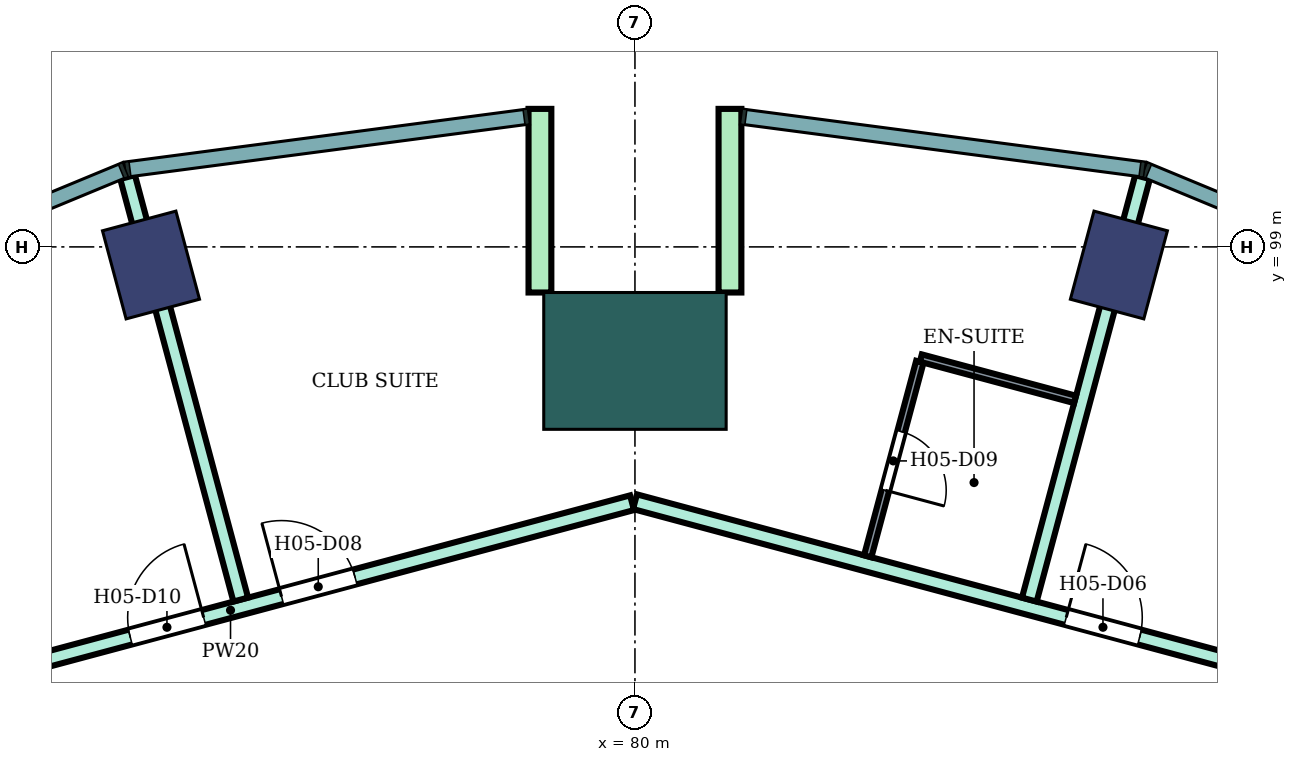
"""IFC4 building model, lengths in metres.
Left out: names, types, materials, properties, quantities, classifications, styles, units other than length and angle.
Written with IfcOpenShell. Run it as: python <this file> out.ifc"""

import sys

from ifc_helpers import new_model, si_unit, direction, frame, frame_2d, origin, origin_2d, place, context, subcontext, project, spatial, rectangle, extrude, element, fill, save


model = new_model("IFC4")
c1 = context("Model", 3, precision=1e-05, world=origin(), true_north=direction((0.0, 1.0)))
c2 = subcontext(c1, "Body", "Model", "MODEL_VIEW")
j1 = project(units=[si_unit("LENGTHUNIT", "METRE"), si_unit("PLANEANGLEUNIT", "RADIAN")], contexts=[c1])
p1 = place(None, origin())
s1 = spatial("IfcSite", under=j1, at=p1, CompositionType="ELEMENT")
p2 = place(p1, origin())
s2 = spatial("IfcBuilding", under=s1, at=p2, CompositionType="ELEMENT")
p3 = place(p2, frame((0.0, 0.0, 82.4)))
s3 = spatial("IfcBuildingStorey", under=s2, at=p3, CompositionType="ELEMENT", Elevation=82.4)
for number, where, z_axis, x_axis in (
    (1, (86.367, 98.762, 0.0), (0.0, 0.0, 1.0), (0.259, 0.966, 0.0)),
    (2, (73.633, 98.762, 0.0), (0.0, 0.0, 1.0), (-0.259, 0.966, 0.0)),
):
    element("IfcColumn", number, at=place(p3, frame(where, z_axis=z_axis, x_axis=x_axis)), inside=s3, PredefinedType="COLUMN", context=c2, shape_type="SweptSolid", body=[
        extrude(rectangle(XDim=1.2, YDim=1.0, at=origin_2d()), origin(), (0.0, 0.0, 1.0), 3.8),
    ])
p4 = place(p3, frame((80.0, 97.5, 0.0), z_axis=(0.0, 0.0, 1.0), x_axis=(0.0, 1.0, 0.0)))
e3 = element("IfcColumn", 3, at=p4, inside=s3, PredefinedType="COLUMN", context=c2, shape_type="SweptSolid", body=[
    extrude(rectangle(XDim=1.8, YDim=2.4, at=origin_2d()), origin(), (0.0, 0.0, 1.0), 3.8),
])
for number, where, z_axis, x_axis in (
    (4, (81.25, 98.4, 0.0), (0.0, 0.0, 1.0), (0.0, 1.0, 0.0)),
    (5, (78.75, 98.4, 0.0), (0.0, 0.0, 1.0), (0.0, 1.0, 0.0)),
):
    element("IfcWall", number, at=place(p3, frame(where, z_axis=z_axis, x_axis=x_axis)), inside=s3, PredefinedType="NOTDEFINED", context=c2, shape_type="SweptSolid", body=[
        extrude(rectangle(XDim=2.416, YDim=0.3, at=frame_2d((1.208, 0.0))), origin(), (0.0, 0.0, 1.0), 3.8),
    ])
p5 = place(p3, frame((69.397, 92.805, 0.0), z_axis=(0.0, 0.0, 1.0), x_axis=(0.96596468683, 0.258673972015, 0.0)))
e6 = element("IfcWall", 6, at=p5, inside=s3, PredefinedType="PARTITIONING", context=c2, shape_type="SweptSolid", body=[
    extrude(rectangle(XDim=10.937, YDim=0.2, at=frame_2d((5.469, 0.0))), origin(), (0.0, 0.0, 1.0), 3.35),
])
p6 = place(p5, frame((6.163, 0.0, 0.0)))
e7 = element("IfcOpeningElement", 7, at=p6, cuts=e6, PredefinedType="OPENING", context=c2, shape_type="SweptSolid", body=[
    extrude(rectangle(XDim=1.0, YDim=2.1, at=frame_2d((0.5, 1.05))), frame((0.0, 0.11, 0.0), z_axis=(0.0, -1.0, 0.0), x_axis=(1.0, 0.0, 0.0)), (0.0, 0.0, 1.0), 0.22),
])
p7 = place(p5, frame((4.103, 0.0, 0.0)))
e8 = element("IfcOpeningElement", 8, at=p7, cuts=e6, PredefinedType="OPENING", context=c2, shape_type="SweptSolid", body=[
    extrude(rectangle(XDim=1.0, YDim=2.1, at=frame_2d((0.5, 1.05))), frame((0.0, 0.11, 0.0), z_axis=(0.0, -1.0, 0.0), x_axis=(1.0, 0.0, 0.0)), (0.0, 0.0, 1.0), 0.22),
])
p8 = place(p3, frame((73.325, 99.919, 0.0), z_axis=(0.0, 0.0, 1.0), x_axis=(0.25871346471, -0.965954110286, 0.0)))
e9 = element("IfcWall", 9, at=p8, inside=s3, PredefinedType="PARTITIONING", context=c2, shape_type="SweptSolid", body=[
    extrude(rectangle(XDim=5.754, YDim=0.2, at=frame_2d((2.877, 0.0))), origin(), (0.0, 0.0, 1.0), 3.35),
])
p9 = place(p3, frame((80.0, 95.648, 0.0), z_axis=(0.0, 0.0, 1.0), x_axis=(0.965852259202, -0.259093445292, 0.0)))
e10 = element("IfcWall", 10, at=p9, inside=s3, PredefinedType="PARTITIONING", context=c2, shape_type="SweptSolid", body=[
    extrude(rectangle(XDim=10.597, YDim=0.2, at=frame_2d((5.298, 0.0))), origin(), (0.0, 0.0, 1.0), 3.35),
])
p10 = place(p9, frame((5.875, 0.0, 0.0)))
e11 = element("IfcOpeningElement", 11, at=p10, cuts=e10, PredefinedType="OPENING", context=c2, shape_type="SweptSolid", body=[
    extrude(rectangle(XDim=1.0, YDim=2.1, at=frame_2d((0.5, 1.05))), frame((0.0, 0.11, 0.0), z_axis=(0.0, -1.0, 0.0), x_axis=(1.0, 0.0, 0.0)), (0.0, 0.0, 1.0), 0.22),
])
p11 = place(p3, frame((85.188, 94.36, 0.0), z_axis=(0.0, 0.0, 1.0), x_axis=(0.258882407816, 0.965908846074, 0.0)))
e12 = element("IfcWall", 12, at=p11, inside=s3, PredefinedType="PARTITIONING", context=c2, shape_type="SweptSolid", body=[
    extrude(rectangle(XDim=5.755, YDim=0.2, at=frame_2d((2.877, 0.0))), origin(), (0.0, 0.0, 1.0), 3.35),
])
p12 = place(p3, frame((83.062, 94.929, 0.0), z_axis=(0.0, 0.0, 1.0), x_axis=(0.258889588814, 0.965906921398, 0.0)))
e13 = element("IfcWall", 13, at=p12, inside=s3, PredefinedType="PARTITIONING", context=c2, shape_type="SweptSolid", body=[
    extrude(rectangle(XDim=2.65, YDim=0.1, at=frame_2d((1.325, 0.0))), origin(), (0.0, 0.0, 1.0), 3.35),
])
p13 = place(p12, frame((0.9, 0.0, 0.0)))
e14 = element("IfcOpeningElement", 14, at=p13, cuts=e13, PredefinedType="OPENING", context=c2, shape_type="SweptSolid", body=[
    extrude(rectangle(XDim=0.8, YDim=2.1, at=frame_2d((0.4, 1.05))), frame((0.0, 0.06, 0.0), z_axis=(0.0, -1.0, 0.0), x_axis=(1.0, 0.0, 0.0)), (0.0, 0.0, 1.0), 0.12),
])
p14 = place(p3, frame((83.761, 97.538, 0.0), z_axis=(0.0, 0.0, 1.0), x_axis=(0.965871218513, -0.259022758166, 0.0)))
e15 = element("IfcWall", 15, at=p14, inside=s3, PredefinedType="PARTITIONING", context=c2, shape_type="SweptSolid", body=[
    extrude(rectangle(XDim=2.1, YDim=0.1, at=frame_2d((1.05, 0.0))), origin(), (0.0, 0.0, 1.0), 3.35),
])
p15 = place(p10, origin())
e16 = element("IfcDoor", 16, at=p15, inside=s3, OperationType="SINGLE_SWING_LEFT", PredefinedType="DOOR", context=c2, shape_type="SweptSolid", body=[
    extrude(rectangle(XDim=1.0, YDim=2.1, at=frame_2d((0.5, 1.05))), frame((0.0, 0.025, 0.0), z_axis=(0.0, -1.0, 0.0), x_axis=(1.0, 0.0, 0.0)), (0.0, 0.0, 1.0), 0.05),
])
fill(e11, e16)
p16 = place(p6, origin())
e17 = element("IfcDoor", 17, at=p16, inside=s3, OperationType="SINGLE_SWING_LEFT", PredefinedType="DOOR", context=c2, shape_type="SweptSolid", body=[
    extrude(rectangle(XDim=1.0, YDim=2.1, at=frame_2d((0.5, 1.05))), frame((0.0, 0.025, 0.0), z_axis=(0.0, -1.0, 0.0), x_axis=(1.0, 0.0, 0.0)), (0.0, 0.0, 1.0), 0.05),
])
fill(e7, e17)
p17 = place(p13, frame((0.8, 0.0, 0.0), z_axis=(0.0, 0.0, 1.0), x_axis=(-1.0, 0.0, 0.0)))
e18 = element("IfcDoor", 18, at=p17, inside=s3, OperationType="SINGLE_SWING_RIGHT", PredefinedType="DOOR", context=c2, shape_type="SweptSolid", body=[
    extrude(rectangle(XDim=0.8, YDim=2.1, at=frame_2d((0.4, 1.05))), frame((0.0, 0.025, 0.0), z_axis=(0.0, -1.0, 0.0), x_axis=(1.0, 0.0, 0.0)), (0.0, 0.0, 1.0), 0.05),
])
fill(e14, e18)
p18 = place(p7, origin())
e19 = element("IfcDoor", 19, at=p18, inside=s3, OperationType="SINGLE_SWING_RIGHT", PredefinedType="DOOR", context=c2, shape_type="SweptSolid", body=[
    extrude(rectangle(XDim=1.0, YDim=2.1, at=frame_2d((0.5, 1.05))), frame((0.0, 0.025, 0.0), z_axis=(0.0, -1.0, 0.0), x_axis=(1.0, 0.0, 0.0)), (0.0, 0.0, 1.0), 0.05),
])
fill(e8, e19)
save(model, sys.argv[1])
